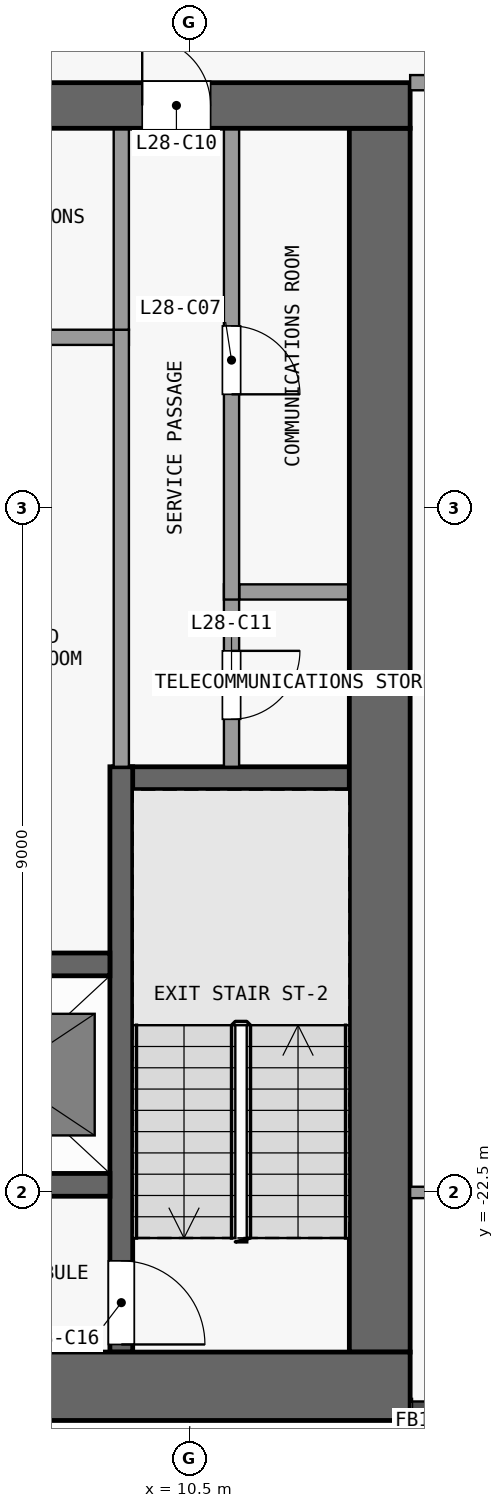
"""IFC4 building model, lengths in metres.
Left out: names, types, materials, properties, quantities, classifications, styles, units other than length and angle.
Written with IfcOpenShell. Run it as: python <this file> out.ifc"""

import sys

from ifc_helpers import new_model, si_unit, direction, frame, frame_2d, origin, place, context, subcontext, project, spatial, rectangle, extrude, element, fill, save


model = new_model("IFC4")
c1 = context("Model", 3, precision=1e-05, world=origin(), true_north=direction((0.0, 1.0)))
c2 = subcontext(c1, "Body", "Model", "MODEL_VIEW")
j1 = project(units=[si_unit("LENGTHUNIT", "METRE"), si_unit("PLANEANGLEUNIT", "RADIAN")], contexts=[c1])
p1 = place(None, origin())
s1 = spatial("IfcSite", under=j1, at=p1, CompositionType="ELEMENT")
p2 = place(p1, origin())
s2 = spatial("IfcBuilding", under=s1, at=p2, CompositionType="ELEMENT")
p3 = place(p2, frame((0.0, 0.0, 113.5)))
s3 = spatial("IfcBuildingStorey", under=s2, at=p3, CompositionType="ELEMENT", Elevation=113.5)
p4 = place(p3, frame((-13.4, -25.05, 0.0), z_axis=(0.0, 0.0, 1.0), x_axis=(1.0, 0.0, 0.0)))
e1 = element("IfcWall", 1, at=p4, inside=s3, PredefinedType="SHEAR", context=c2, shape_type="SweptSolid", body=[
    extrude(rectangle(XDim=26.8, YDim=0.9, at=frame_2d((13.4, 0.0))), origin(), (0.0, 0.0, 1.0), 3.3),
])
p5 = place(p3, frame((-13.4, -8.2, 0.0), z_axis=(0.0, 0.0, 1.0), x_axis=(1.0, 0.0, 0.0)))
e2 = element("IfcWall", 2, at=p5, inside=s3, PredefinedType="SHEAR", context=c2, shape_type="SweptSolid", body=[
    extrude(rectangle(XDim=26.8, YDim=0.6, at=frame_2d((13.4, 0.0))), origin(), (0.0, 0.0, 1.0), 3.3),
])
p6 = place(p5, frame((7.7, 0.0, 0.0)))
e3 = element("IfcOpeningElement", 3, at=p6, cuts=e2, PredefinedType="OPENING", context=c2, shape_type="SweptSolid", body=[
    extrude(rectangle(XDim=1.8, YDim=2.1, at=frame_2d((0.9, 1.05))), frame((0.0, 0.31, 0.0), z_axis=(0.0, -1.0, 0.0), x_axis=(1.0, 0.0, 0.0)), (0.0, 0.0, 1.0), 0.62),
])
p7 = place(p5, frame((17.3, 0.0, 0.0)))
e4 = element("IfcOpeningElement", 4, at=p7, cuts=e2, PredefinedType="OPENING", context=c2, shape_type="SweptSolid", body=[
    extrude(rectangle(XDim=1.8, YDim=2.1, at=frame_2d((0.9, 1.05))), frame((0.0, 0.31, 0.0), z_axis=(0.0, -1.0, 0.0), x_axis=(1.0, 0.0, 0.0)), (0.0, 0.0, 1.0), 0.62),
])
p8 = place(p5, frame((1.625, 0.0, 0.0)))
e5 = element("IfcOpeningElement", 5, at=p8, cuts=e2, PredefinedType="OPENING", context=c2, shape_type="SweptSolid", body=[
    extrude(rectangle(XDim=1.2, YDim=2.1, at=frame_2d((0.6, 1.05))), frame((0.0, 0.31, 0.0), z_axis=(0.0, -1.0, 0.0), x_axis=(1.0, 0.0, 0.0)), (0.0, 0.0, 1.0), 0.62),
])
p9 = place(p5, frame((23.275, 0.0, 0.0)))
e6 = element("IfcOpeningElement", 6, at=p9, cuts=e2, PredefinedType="OPENING", context=c2, shape_type="SweptSolid", body=[
    extrude(rectangle(XDim=0.9, YDim=2.1, at=frame_2d((0.45, 1.05))), frame((0.0, 0.31, 0.0), z_axis=(0.0, -1.0, 0.0), x_axis=(1.0, 0.0, 0.0)), (0.0, 0.0, 1.0), 0.62),
])
p10 = place(p3, frame((13.0, -24.6, 0.0), z_axis=(0.0, 0.0, 1.0), x_axis=(0.0, 1.0, 0.0)))
e7 = element("IfcWall", 7, at=p10, inside=s3, PredefinedType="SHEAR", context=c2, shape_type="SweptSolid", body=[
    extrude(rectangle(XDim=16.1, YDim=0.8, at=frame_2d((8.05, 0.0))), origin(), (0.0, 0.0, 1.0), 3.3),
])
p11 = place(p3, frame((6.35, -22.4, 0.0), z_axis=(0.0, 0.0, 1.0), x_axis=(1.0, 0.0, 0.0)))
e8 = element("IfcWall", 8, at=p11, inside=s3, PredefinedType="SHEAR", context=c2, shape_type="SweptSolid", body=[
    extrude(rectangle(XDim=3.1, YDim=0.3, at=frame_2d((1.55, 0.0))), origin(), (0.0, 0.0, 1.0), 3.3),
])
p12 = place(p3, frame((6.425, -19.5, 0.0), z_axis=(0.0, 0.0, 1.0), x_axis=(1.0, 0.0, 0.0)))
e9 = element("IfcWall", 9, at=p12, inside=s3, PredefinedType="SHEAR", context=c2, shape_type="SweptSolid", body=[
    extrude(rectangle(XDim=3.025, YDim=0.3, at=frame_2d((1.512, 0.0))), origin(), (0.0, 0.0, 1.0), 3.3),
])
p13 = place(p3, frame((9.5, -17.05, 0.0), z_axis=(0.0, 0.0, 1.0), x_axis=(1.0, 0.0, 0.0)))
e10 = element("IfcWall", 10, at=p13, inside=s3, PredefinedType="SHEAR", context=c2, shape_type="SweptSolid", body=[
    extrude(rectangle(XDim=3.1, YDim=0.3, at=frame_2d((1.55, 0.0))), origin(), (0.0, 0.0, 1.0), 3.3),
])
p14 = place(p3, frame((11.15, -14.6, 0.0), z_axis=(0.0, 0.0, 1.0), x_axis=(1.0, 0.0, 0.0)))
e11 = element("IfcWall", 11, at=p14, inside=s3, PredefinedType="PARTITIONING", context=c2, shape_type="SweptSolid", body=[
    extrude(rectangle(XDim=1.45, YDim=0.2, at=frame_2d((0.725, 0.0))), origin(), (0.0, 0.0, 1.0), 3.3),
])
p15 = place(p3, frame((6.4, -11.25, 0.0), z_axis=(0.0, 0.0, 1.0), x_axis=(1.0, 0.0, 0.0)))
e12 = element("IfcWall", 12, at=p15, inside=s3, PredefinedType="PARTITIONING", context=c2, shape_type="SweptSolid", body=[
    extrude(rectangle(XDim=3.3, YDim=0.2, at=frame_2d((1.65, 0.0))), origin(), (0.0, 0.0, 1.0), 3.3),
])
p16 = place(p3, frame((9.6, -16.9, 0.0), z_axis=(0.0, 0.0, 1.0), x_axis=(0.0, -1.0, 0.0)))
e13 = element("IfcWall", 13, at=p16, inside=s3, PredefinedType="SHEAR", context=c2, shape_type="SweptSolid", body=[
    extrude(rectangle(XDim=7.7, YDim=0.3, at=frame_2d((3.85, 0.0))), origin(), (0.0, 0.0, 1.0), 3.3),
])
p17 = place(p16, frame((6.5, 0.0, 0.0)))
e14 = element("IfcOpeningElement", 14, at=p17, cuts=e13, PredefinedType="OPENING", context=c2, shape_type="SweptSolid", body=[
    extrude(rectangle(XDim=1.1, YDim=2.1, at=frame_2d((0.55, 1.05))), frame((0.0, 0.16, 0.0), z_axis=(0.0, -1.0, 0.0), x_axis=(1.0, 0.0, 0.0)), (0.0, 0.0, 1.0), 0.32),
])
p18 = place(p3, frame((9.6, -16.9, 0.0), z_axis=(0.0, 0.0, 1.0), x_axis=(0.0, 1.0, 0.0)))
e15 = element("IfcWall", 15, at=p18, inside=s3, PredefinedType="PARTITIONING", context=c2, shape_type="SweptSolid", body=[
    extrude(rectangle(XDim=5.75, YDim=0.2, at=frame_2d((2.875, 0.0))), origin(), (0.0, 0.0, 1.0), 3.3),
])
p19 = place(p3, frame((9.6, -11.15, 0.0), z_axis=(0.0, 0.0, 1.0), x_axis=(0.0, 1.0, 0.0)))
e16 = element("IfcWall", 16, at=p19, inside=s3, PredefinedType="PARTITIONING", context=c2, shape_type="SweptSolid", body=[
    extrude(rectangle(XDim=2.65, YDim=0.2, at=frame_2d((1.325, 0.0))), origin(), (0.0, 0.0, 1.0), 3.3),
])
p20 = place(p3, frame((11.05, -14.5, 0.0), z_axis=(0.0, 0.0, 1.0), x_axis=(0.0, -1.0, 0.0)))
e17 = element("IfcWall", 17, at=p20, inside=s3, PredefinedType="PARTITIONING", context=c2, shape_type="SweptSolid", body=[
    extrude(rectangle(XDim=2.4, YDim=0.2, at=frame_2d((1.2, 0.0))), origin(), (0.0, 0.0, 1.0), 3.3),
])
p21 = place(p20, frame((0.875, 0.0, 0.0)))
e18 = element("IfcOpeningElement", 18, at=p21, cuts=e17, PredefinedType="OPENING", context=c2, shape_type="SweptSolid", body=[
    extrude(rectangle(XDim=0.9, YDim=2.1, at=frame_2d((0.45, 1.05))), frame((0.0, 0.11, 0.0), z_axis=(0.0, -1.0, 0.0), x_axis=(1.0, 0.0, 0.0)), (0.0, 0.0, 1.0), 0.22),
])
p22 = place(p3, frame((11.05, -8.5, 0.0), z_axis=(0.0, 0.0, 1.0), x_axis=(0.0, -1.0, 0.0)))
e19 = element("IfcWall", 19, at=p22, inside=s3, PredefinedType="PARTITIONING", context=c2, shape_type="SweptSolid", body=[
    extrude(rectangle(XDim=6.2, YDim=0.2, at=frame_2d((3.1, 0.0))), origin(), (0.0, 0.0, 1.0), 3.3),
])
p23 = place(p22, frame((2.6, 0.0, 0.0)))
e20 = element("IfcOpeningElement", 20, at=p23, cuts=e19, PredefinedType="OPENING", context=c2, shape_type="SweptSolid", body=[
    extrude(rectangle(XDim=0.9, YDim=2.1, at=frame_2d((0.45, 1.05))), frame((0.0, 0.11, 0.0), z_axis=(0.0, -1.0, 0.0), x_axis=(1.0, 0.0, 0.0)), (0.0, 0.0, 1.0), 0.22),
])
p24 = place(p3, frame((13.4, -22.5, 0.0), z_axis=(0.0, 0.0, 1.0), x_axis=(1.0, 0.0, 0.0)))
e21 = element("IfcWall", 21, at=p24, inside=s3, PredefinedType="PARTITIONING", context=c2, shape_type="SweptSolid", body=[
    extrude(rectangle(XDim=2.925, YDim=0.15, at=frame_2d((1.462, 0.0))), origin(), (0.0, 0.0, 1.0), 3.3),
])
p25 = place(p24, frame((1.0, 0.0, 0.0)))
e22 = element("IfcOpeningElement", 22, at=p25, cuts=e21, PredefinedType="OPENING", context=c2, shape_type="SweptSolid", body=[
    extrude(rectangle(XDim=0.9, YDim=2.1, at=frame_2d((0.45, 1.05))), frame((0.0, 0.085, 0.0), z_axis=(0.0, -1.0, 0.0), x_axis=(1.0, 0.0, 0.0)), (0.0, 0.0, 1.0), 0.17),
])
p26 = place(p3, frame((13.4, -7.9, 0.0), z_axis=(0.0, 0.0, 1.0), x_axis=(1.0, 0.0, 0.0)))
e23 = element("IfcWall", 23, at=p26, inside=s3, PredefinedType="PARTITIONING", context=c2, shape_type="SweptSolid", body=[
    extrude(rectangle(XDim=11.85, YDim=0.2, at=frame_2d((5.925, 0.0))), origin(), (0.0, 0.0, 1.0), 3.3),
])
p27 = place(p26, frame((1.0, 0.0, 0.0)))
e24 = element("IfcOpeningElement", 24, at=p27, cuts=e23, PredefinedType="OPENING", context=c2, shape_type="SweptSolid", body=[
    extrude(rectangle(XDim=1.0, YDim=2.1, at=frame_2d((0.5, 1.05))), frame((0.0, 0.11, 0.0), z_axis=(0.0, -1.0, 0.0), x_axis=(1.0, 0.0, 0.0)), (0.0, 0.0, 1.0), 0.22),
])
p28 = place(p23, origin())
e25 = element("IfcDoor", 25, at=p28, inside=s3, OperationType="SINGLE_SWING_RIGHT", PredefinedType="DOOR", context=c2, shape_type="SweptSolid", body=[
    extrude(rectangle(XDim=0.9, YDim=2.1, at=frame_2d((0.45, 1.05))), frame((0.0, 0.025, 0.0), z_axis=(0.0, -1.0, 0.0), x_axis=(1.0, 0.0, 0.0)), (0.0, 0.0, 1.0), 0.05),
])
fill(e20, e25)
p29 = place(p9, origin())
e26 = element("IfcDoor", 26, at=p29, inside=s3, OperationType="SINGLE_SWING_LEFT", PredefinedType="DOOR", context=c2, shape_type="SweptSolid", body=[
    extrude(rectangle(XDim=0.9, YDim=2.1, at=frame_2d((0.45, 1.05))), frame((0.0, 0.025, 0.0), z_axis=(0.0, -1.0, 0.0), x_axis=(1.0, 0.0, 0.0)), (0.0, 0.0, 1.0), 0.05),
])
fill(e6, e26)
p30 = place(p21, origin())
e27 = element("IfcDoor", 27, at=p30, inside=s3, OperationType="SINGLE_SWING_LEFT", PredefinedType="DOOR", context=c2, shape_type="SweptSolid", body=[
    extrude(rectangle(XDim=0.9, YDim=2.1, at=frame_2d((0.45, 1.05))), frame((0.0, 0.025, 0.0), z_axis=(0.0, -1.0, 0.0), x_axis=(1.0, 0.0, 0.0)), (0.0, 0.0, 1.0), 0.05),
])
fill(e18, e27)
p31 = place(p17, origin())
e28 = element("IfcDoor", 28, at=p31, inside=s3, OperationType="SINGLE_SWING_RIGHT", PredefinedType="DOOR", context=c2, shape_type="SweptSolid", body=[
    extrude(rectangle(XDim=1.1, YDim=2.1, at=frame_2d((0.55, 1.05))), frame((0.0, 0.025, 0.0), z_axis=(0.0, -1.0, 0.0), x_axis=(1.0, 0.0, 0.0)), (0.0, 0.0, 1.0), 0.05),
])
fill(e14, e28)
save(model, sys.argv[1])
